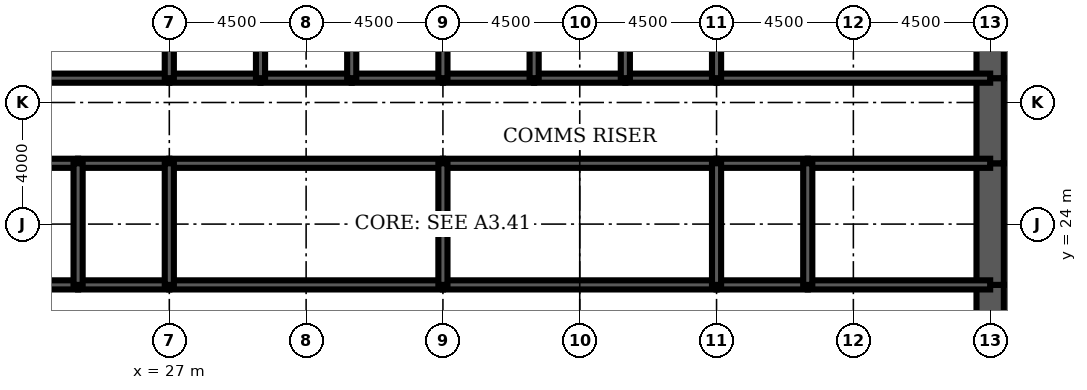
"""IFC4 building model, lengths in metres.
Left out: names, types, materials, properties, quantities, classifications, styles, units other than length and angle.
Written with IfcOpenShell. Run it as: python <this file> out.ifc"""

import sys

from ifc_helpers import new_model, si_unit, direction, frame, frame_2d, origin, place, context, subcontext, project, spatial, rectangle, extrude, element, fill, save


model = new_model("IFC4")
c1 = context("Model", 3, precision=1e-05, world=origin(), true_north=direction((0.0, 1.0)))
c2 = subcontext(c1, "Body", "Model", "MODEL_VIEW")
j1 = project(units=[si_unit("LENGTHUNIT", "METRE"), si_unit("PLANEANGLEUNIT", "RADIAN")], contexts=[c1])
p1 = place(None, origin())
s1 = spatial("IfcSite", under=j1, at=p1, CompositionType="ELEMENT")
p2 = place(p1, origin())
s2 = spatial("IfcBuilding", under=s1, at=p2, CompositionType="ELEMENT")
p3 = place(p2, frame((0.0, 0.0, 176.1)))
s3 = spatial("IfcBuildingStorey", under=s2, at=p3, CompositionType="ELEMENT", Elevation=176.1)
p4 = place(p3, frame((54.0, 19.2, 0.0), z_axis=(0.0, 0.0, 1.0), x_axis=(0.0, 1.0, 0.0)))
e1 = element("IfcWall", 1, at=p4, inside=s3, PredefinedType="SHEAR", context=c2, shape_type="SweptSolid", body=[
    extrude(rectangle(XDim=2.8, YDim=0.9, at=frame_2d((1.4, 0.0))), origin(), (0.0, 0.0, 1.0), 4.2),
])
p5 = place(p4, frame((0.4, 0.0, 0.0)))
e2 = element("IfcOpeningElement", 2, at=p5, cuts=e1, PredefinedType="OPENING", context=c2, shape_type="SweptSolid", body=[
    extrude(rectangle(XDim=1.8, YDim=2.1, at=frame_2d((0.9, 1.05))), frame((0.0, 0.46, 0.0), z_axis=(0.0, -1.0, 0.0), x_axis=(1.0, 0.0, 0.0)), (0.0, 0.0, 1.0), 0.92),
])
p6 = place(p3, frame((54.0, 22.0, 0.0), z_axis=(0.0, 0.0, 1.0), x_axis=(0.0, 1.0, 0.0)))
e3 = element("IfcWall", 3, at=p6, inside=s3, PredefinedType="SHEAR", context=c2, shape_type="SweptSolid", body=[
    extrude(rectangle(XDim=4.0, YDim=0.9, at=frame_2d((2.0, 0.0))), origin(), (0.0, 0.0, 1.0), 4.2),
])
p7 = place(p3, frame((54.0, 26.0, 0.0), z_axis=(0.0, 0.0, 1.0), x_axis=(0.0, 1.0, 0.0)))
e4 = element("IfcWall", 4, at=p7, inside=s3, PredefinedType="SHEAR", context=c2, shape_type="SweptSolid", body=[
    extrude(rectangle(XDim=2.8, YDim=0.9, at=frame_2d((1.4, 0.0))), origin(), (0.0, 0.0, 1.0), 4.2),
])
p8 = place(p7, frame((0.6, 0.0, 0.0)))
e5 = element("IfcOpeningElement", 5, at=p8, cuts=e4, PredefinedType="OPENING", context=c2, shape_type="SweptSolid", body=[
    extrude(rectangle(XDim=1.8, YDim=2.1, at=frame_2d((0.9, 1.05))), frame((0.0, 0.46, 0.0), z_axis=(0.0, -1.0, 0.0), x_axis=(1.0, 0.0, 0.0)), (0.0, 0.0, 1.0), 0.92),
])
p9 = place(p3, frame((54.0, 28.8, 0.0), z_axis=(0.0, 0.0, 1.0), x_axis=(0.0, 1.0, 0.0)))
e6 = element("IfcWall", 6, at=p9, inside=s3, PredefinedType="SHEAR", context=c2, shape_type="SweptSolid", body=[
    extrude(rectangle(XDim=3.2, YDim=0.9, at=frame_2d((1.6, 0.0))), origin(), (0.0, 0.0, 1.0), 4.2),
])
p10 = place(p3, frame((18.0, 28.8, 0.0), z_axis=(0.0, 0.0, 1.0), x_axis=(1.0, 0.0, 0.0)))
e7 = element("IfcWall", 7, at=p10, inside=s3, PredefinedType="SOLIDWALL", context=c2, shape_type="SweptSolid", body=[
    extrude(rectangle(XDim=9.0, YDim=0.3, at=frame_2d((4.5, 0.0))), origin(), (0.0, 0.0, 1.0), 4.2),
])
p11 = place(p10, frame((0.65, 0.0, 0.0)))
e8 = element("IfcOpeningElement", 8, at=p11, cuts=e7, PredefinedType="OPENING", context=c2, shape_type="SweptSolid", body=[
    extrude(rectangle(XDim=1.0, YDim=2.1, at=frame_2d((0.5, 1.05))), frame((0.0, 0.16, 0.0), z_axis=(0.0, -1.0, 0.0), x_axis=(1.0, 0.0, 0.0)), (0.0, 0.0, 1.0), 0.32),
])
p12 = place(p3, frame((27.0, 28.8, 0.0), z_axis=(0.0, 0.0, 1.0), x_axis=(1.0, 0.0, 0.0)))
e9 = element("IfcWall", 9, at=p12, inside=s3, PredefinedType="SOLIDWALL", context=c2, shape_type="SweptSolid", body=[
    extrude(rectangle(XDim=3.0, YDim=0.3, at=frame_2d((1.5, 0.0))), origin(), (0.0, 0.0, 1.0), 4.2),
])
p13 = place(p12, frame((0.95, 0.0, 0.0)))
e10 = element("IfcOpeningElement", 10, at=p13, cuts=e9, PredefinedType="OPENING", context=c2, shape_type="SweptSolid", body=[
    extrude(rectangle(XDim=1.1, YDim=2.2, at=frame_2d((0.55, 1.1))), frame((0.0, 0.16, 0.0), z_axis=(0.0, -1.0, 0.0), x_axis=(1.0, 0.0, 0.0)), (0.0, 0.0, 1.0), 0.32),
])
p14 = place(p3, frame((30.0, 28.8, 0.0), z_axis=(0.0, 0.0, 1.0), x_axis=(1.0, 0.0, 0.0)))
e11 = element("IfcWall", 11, at=p14, inside=s3, PredefinedType="SOLIDWALL", context=c2, shape_type="SweptSolid", body=[
    extrude(rectangle(XDim=3.0, YDim=0.3, at=frame_2d((1.5, 0.0))), origin(), (0.0, 0.0, 1.0), 4.2),
])
p15 = place(p14, frame((0.95, 0.0, 0.0)))
e12 = element("IfcOpeningElement", 12, at=p15, cuts=e11, PredefinedType="OPENING", context=c2, shape_type="SweptSolid", body=[
    extrude(rectangle(XDim=1.1, YDim=2.2, at=frame_2d((0.55, 1.1))), frame((0.0, 0.16, 0.0), z_axis=(0.0, -1.0, 0.0), x_axis=(1.0, 0.0, 0.0)), (0.0, 0.0, 1.0), 0.32),
])
p16 = place(p3, frame((33.0, 28.8, 0.0), z_axis=(0.0, 0.0, 1.0), x_axis=(1.0, 0.0, 0.0)))
e13 = element("IfcWall", 13, at=p16, inside=s3, PredefinedType="SOLIDWALL", context=c2, shape_type="SweptSolid", body=[
    extrude(rectangle(XDim=3.0, YDim=0.3, at=frame_2d((1.5, 0.0))), origin(), (0.0, 0.0, 1.0), 4.2),
])
p17 = place(p16, frame((0.95, 0.0, 0.0)))
e14 = element("IfcOpeningElement", 14, at=p17, cuts=e13, PredefinedType="OPENING", context=c2, shape_type="SweptSolid", body=[
    extrude(rectangle(XDim=1.1, YDim=2.2, at=frame_2d((0.55, 1.1))), frame((0.0, 0.16, 0.0), z_axis=(0.0, -1.0, 0.0), x_axis=(1.0, 0.0, 0.0)), (0.0, 0.0, 1.0), 0.32),
])
for number, where, z_axis, x_axis in (
    (15, (36.0, 28.8, 0.0), (0.0, 0.0, 1.0), (1.0, 0.0, 0.0)),
    (16, (39.0, 28.8, 0.0), (0.0, 0.0, 1.0), (1.0, 0.0, 0.0)),
):
    element("IfcWall", number, at=place(p3, frame(where, z_axis=z_axis, x_axis=x_axis)), inside=s3, PredefinedType="SOLIDWALL", context=c2, shape_type="SweptSolid", body=[
        extrude(rectangle(XDim=3.0, YDim=0.3, at=frame_2d((1.5, 0.0))), origin(), (0.0, 0.0, 1.0), 4.2),
    ])
p18 = place(p3, frame((42.0, 28.8, 0.0), z_axis=(0.0, 0.0, 1.0), x_axis=(1.0, 0.0, 0.0)))
e17 = element("IfcWall", 17, at=p18, inside=s3, PredefinedType="SOLIDWALL", context=c2, shape_type="SweptSolid", body=[
    extrude(rectangle(XDim=3.0, YDim=0.3, at=frame_2d((1.5, 0.0))), origin(), (0.0, 0.0, 1.0), 4.2),
])
p19 = place(p18, frame((0.95, 0.0, 0.0)))
e18 = element("IfcOpeningElement", 18, at=p19, cuts=e17, PredefinedType="OPENING", context=c2, shape_type="SweptSolid", body=[
    extrude(rectangle(XDim=1.1, YDim=2.2, at=frame_2d((0.55, 1.1))), frame((0.0, 0.16, 0.0), z_axis=(0.0, -1.0, 0.0), x_axis=(1.0, 0.0, 0.0)), (0.0, 0.0, 1.0), 0.32),
])
p20 = place(p3, frame((45.0, 28.8, 0.0), z_axis=(0.0, 0.0, 1.0), x_axis=(1.0, 0.0, 0.0)))
e19 = element("IfcWall", 19, at=p20, inside=s3, PredefinedType="SOLIDWALL", context=c2, shape_type="SweptSolid", body=[
    extrude(rectangle(XDim=9.0, YDim=0.3, at=frame_2d((4.5, 0.0))), origin(), (0.0, 0.0, 1.0), 4.2),
])
p21 = place(p20, frame((7.35, 0.0, 0.0)))
e20 = element("IfcOpeningElement", 20, at=p21, cuts=e19, PredefinedType="OPENING", context=c2, shape_type="SweptSolid", body=[
    extrude(rectangle(XDim=1.0, YDim=2.1, at=frame_2d((0.5, 1.05))), frame((0.0, 0.16, 0.0), z_axis=(0.0, -1.0, 0.0), x_axis=(1.0, 0.0, 0.0)), (0.0, 0.0, 1.0), 0.32),
])
p22 = place(p3, frame((18.0, 22.0, 0.0), z_axis=(0.0, 0.0, 1.0), x_axis=(1.0, 0.0, 0.0)))
e21 = element("IfcWall", 21, at=p22, inside=s3, PredefinedType="SOLIDWALL", context=c2, shape_type="SweptSolid", body=[
    extrude(rectangle(XDim=6.0, YDim=0.3, at=frame_2d((3.0, 0.0))), origin(), (0.0, 0.0, 1.0), 4.2),
])
p23 = place(p22, frame((4.4, 0.0, 0.0)))
e22 = element("IfcOpeningElement", 22, at=p23, cuts=e21, PredefinedType="OPENING", context=c2, shape_type="SweptSolid", body=[
    extrude(rectangle(XDim=1.0, YDim=2.1, at=frame_2d((0.5, 1.05))), frame((0.0, 0.16, 0.0), z_axis=(0.0, -1.0, 0.0), x_axis=(1.0, 0.0, 0.0)), (0.0, 0.0, 1.0), 0.32),
])
p24 = place(p22, frame((0.85, 0.0, 0.0)))
e23 = element("IfcOpeningElement", 23, at=p24, cuts=e21, PredefinedType="OPENING", context=c2, shape_type="SweptSolid", body=[
    extrude(rectangle(XDim=1.0, YDim=2.1, at=frame_2d((0.5, 1.05))), frame((0.0, 0.16, 0.0), z_axis=(0.0, -1.0, 0.0), x_axis=(1.0, 0.0, 0.0)), (0.0, 0.0, 1.0), 0.32),
])
p25 = place(p3, frame((24.0, 22.0, 0.0), z_axis=(0.0, 0.0, 1.0), x_axis=(1.0, 0.0, 0.0)))
e24 = element("IfcWall", 24, at=p25, inside=s3, PredefinedType="SOLIDWALL", context=c2, shape_type="SweptSolid", body=[
    extrude(rectangle(XDim=3.0, YDim=0.3, at=frame_2d((1.5, 0.0))), origin(), (0.0, 0.0, 1.0), 4.2),
])
p26 = place(p25, frame((1.0, 0.0, 0.0)))
e25 = element("IfcOpeningElement", 25, at=p26, cuts=e24, PredefinedType="OPENING", context=c2, shape_type="SweptSolid", body=[
    extrude(rectangle(XDim=1.0, YDim=2.1, at=frame_2d((0.5, 1.05))), frame((0.0, 0.16, 0.0), z_axis=(0.0, -1.0, 0.0), x_axis=(1.0, 0.0, 0.0)), (0.0, 0.0, 1.0), 0.32),
])
p27 = place(p3, frame((27.0, 22.0, 0.0), z_axis=(0.0, 0.0, 1.0), x_axis=(1.0, 0.0, 0.0)))
e26 = element("IfcWall", 26, at=p27, inside=s3, PredefinedType="SOLIDWALL", context=c2, shape_type="SweptSolid", body=[
    extrude(rectangle(XDim=9.0, YDim=0.3, at=frame_2d((4.5, 0.0))), origin(), (0.0, 0.0, 1.0), 4.2),
])
p28 = place(p27, frame((4.0, 0.0, 0.0)))
e27 = element("IfcOpeningElement", 27, at=p28, cuts=e26, PredefinedType="OPENING", context=c2, shape_type="SweptSolid", body=[
    extrude(rectangle(XDim=1.0, YDim=2.1, at=frame_2d((0.5, 1.05))), frame((0.0, 0.16, 0.0), z_axis=(0.0, -1.0, 0.0), x_axis=(1.0, 0.0, 0.0)), (0.0, 0.0, 1.0), 0.32),
])
p29 = place(p3, frame((36.0, 22.0, 0.0), z_axis=(0.0, 0.0, 1.0), x_axis=(1.0, 0.0, 0.0)))
e28 = element("IfcWall", 28, at=p29, inside=s3, PredefinedType="SOLIDWALL", context=c2, shape_type="SweptSolid", body=[
    extrude(rectangle(XDim=9.0, YDim=0.3, at=frame_2d((4.5, 0.0))), origin(), (0.0, 0.0, 1.0), 4.2),
])
p30 = place(p29, frame((4.0, 0.0, 0.0)))
e29 = element("IfcOpeningElement", 29, at=p30, cuts=e28, PredefinedType="OPENING", context=c2, shape_type="SweptSolid", body=[
    extrude(rectangle(XDim=1.0, YDim=2.1, at=frame_2d((0.5, 1.05))), frame((0.0, 0.16, 0.0), z_axis=(0.0, -1.0, 0.0), x_axis=(1.0, 0.0, 0.0)), (0.0, 0.0, 1.0), 0.32),
])
p31 = place(p3, frame((45.0, 22.0, 0.0), z_axis=(0.0, 0.0, 1.0), x_axis=(1.0, 0.0, 0.0)))
e30 = element("IfcWall", 30, at=p31, inside=s3, PredefinedType="SOLIDWALL", context=c2, shape_type="SweptSolid", body=[
    extrude(rectangle(XDim=3.0, YDim=0.3, at=frame_2d((1.5, 0.0))), origin(), (0.0, 0.0, 1.0), 4.2),
])
p32 = place(p31, frame((1.0, 0.0, 0.0)))
e31 = element("IfcOpeningElement", 31, at=p32, cuts=e30, PredefinedType="OPENING", context=c2, shape_type="SweptSolid", body=[
    extrude(rectangle(XDim=1.0, YDim=2.1, at=frame_2d((0.5, 1.05))), frame((0.0, 0.16, 0.0), z_axis=(0.0, -1.0, 0.0), x_axis=(1.0, 0.0, 0.0)), (0.0, 0.0, 1.0), 0.32),
])
p33 = place(p3, frame((48.0, 22.0, 0.0), z_axis=(0.0, 0.0, 1.0), x_axis=(1.0, 0.0, 0.0)))
e32 = element("IfcWall", 32, at=p33, inside=s3, PredefinedType="SOLIDWALL", context=c2, shape_type="SweptSolid", body=[
    extrude(rectangle(XDim=6.0, YDim=0.3, at=frame_2d((3.0, 0.0))), origin(), (0.0, 0.0, 1.0), 4.2),
])
p34 = place(p33, frame((2.0, 0.0, 0.0)))
e33 = element("IfcOpeningElement", 33, at=p34, cuts=e32, PredefinedType="OPENING", context=c2, shape_type="SweptSolid", body=[
    extrude(rectangle(XDim=1.0, YDim=2.1, at=frame_2d((0.5, 1.05))), frame((0.0, 0.16, 0.0), z_axis=(0.0, -1.0, 0.0), x_axis=(1.0, 0.0, 0.0)), (0.0, 0.0, 1.0), 0.32),
])
p35 = place(p33, frame((4.0, 0.0, 0.0)))
e34 = element("IfcOpeningElement", 34, at=p35, cuts=e32, PredefinedType="OPENING", context=c2, shape_type="SweptSolid", body=[
    extrude(rectangle(XDim=1.0, YDim=2.1, at=frame_2d((0.5, 1.05))), frame((0.0, 0.16, 0.0), z_axis=(0.0, -1.0, 0.0), x_axis=(1.0, 0.0, 0.0)), (0.0, 0.0, 1.0), 0.32),
])
p36 = place(p3, frame((18.0, 26.0, 0.0), z_axis=(0.0, 0.0, 1.0), x_axis=(1.0, 0.0, 0.0)))
e35 = element("IfcWall", 35, at=p36, inside=s3, PredefinedType="SOLIDWALL", context=c2, shape_type="SweptSolid", body=[
    extrude(rectangle(XDim=6.0, YDim=0.3, at=frame_2d((3.0, 0.0))), origin(), (0.0, 0.0, 1.0), 4.2),
])
p37 = place(p3, frame((24.0, 26.0, 0.0), z_axis=(0.0, 0.0, 1.0), x_axis=(1.0, 0.0, 0.0)))
e36 = element("IfcWall", 36, at=p37, inside=s3, PredefinedType="SOLIDWALL", context=c2, shape_type="SweptSolid", body=[
    extrude(rectangle(XDim=3.0, YDim=0.3, at=frame_2d((1.5, 0.0))), origin(), (0.0, 0.0, 1.0), 4.2),
])
for number, where, z_axis, x_axis in (
    (37, (27.0, 26.0, 0.0), (0.0, 0.0, 1.0), (1.0, 0.0, 0.0)),
    (38, (36.0, 26.0, 0.0), (0.0, 0.0, 1.0), (1.0, 0.0, 0.0)),
):
    element("IfcWall", number, at=place(p3, frame(where, z_axis=z_axis, x_axis=x_axis)), inside=s3, PredefinedType="SOLIDWALL", context=c2, shape_type="SweptSolid", body=[
        extrude(rectangle(XDim=9.0, YDim=0.3, at=frame_2d((4.5, 0.0))), origin(), (0.0, 0.0, 1.0), 4.2),
    ])
p38 = place(p3, frame((45.0, 26.0, 0.0), z_axis=(0.0, 0.0, 1.0), x_axis=(1.0, 0.0, 0.0)))
e39 = element("IfcWall", 39, at=p38, inside=s3, PredefinedType="SOLIDWALL", context=c2, shape_type="SweptSolid", body=[
    extrude(rectangle(XDim=3.0, YDim=0.3, at=frame_2d((1.5, 0.0))), origin(), (0.0, 0.0, 1.0), 4.2),
])
p39 = place(p3, frame((48.0, 26.0, 0.0), z_axis=(0.0, 0.0, 1.0), x_axis=(1.0, 0.0, 0.0)))
e40 = element("IfcWall", 40, at=p39, inside=s3, PredefinedType="SOLIDWALL", context=c2, shape_type="SweptSolid", body=[
    extrude(rectangle(XDim=6.0, YDim=0.3, at=frame_2d((3.0, 0.0))), origin(), (0.0, 0.0, 1.0), 4.2),
])
for number, where, z_axis, x_axis in (
    (41, (27.0, 28.8, 0.0), (0.0, 0.0, 1.0), (0.0, 1.0, 0.0)),
    (42, (30.0, 28.8, 0.0), (0.0, 0.0, 1.0), (0.0, 1.0, 0.0)),
    (43, (33.0, 28.8, 0.0), (0.0, 0.0, 1.0), (0.0, 1.0, 0.0)),
    (44, (36.0, 28.8, 0.0), (0.0, 0.0, 1.0), (0.0, 1.0, 0.0)),
    (45, (39.0, 28.8, 0.0), (0.0, 0.0, 1.0), (0.0, 1.0, 0.0)),
    (46, (42.0, 28.8, 0.0), (0.0, 0.0, 1.0), (0.0, 1.0, 0.0)),
    (47, (45.0, 28.8, 0.0), (0.0, 0.0, 1.0), (0.0, 1.0, 0.0)),
):
    element("IfcWall", number, at=place(p3, frame(where, z_axis=z_axis, x_axis=x_axis)), inside=s3, PredefinedType="SOLIDWALL", context=c2, shape_type="SweptSolid", body=[
        extrude(rectangle(XDim=3.2, YDim=0.3, at=frame_2d((1.6, 0.0))), origin(), (0.0, 0.0, 1.0), 4.2),
    ])
for number, where, z_axis, x_axis in (
    (48, (24.0, 22.0, 0.0), (0.0, 0.0, 1.0), (0.0, 1.0, 0.0)),
    (49, (27.0, 22.0, 0.0), (0.0, 0.0, 1.0), (0.0, 1.0, 0.0)),
    (50, (36.0, 22.0, 0.0), (0.0, 0.0, 1.0), (0.0, 1.0, 0.0)),
    (51, (45.0, 22.0, 0.0), (0.0, 0.0, 1.0), (0.0, 1.0, 0.0)),
    (52, (48.0, 22.0, 0.0), (0.0, 0.0, 1.0), (0.0, 1.0, 0.0)),
):
    element("IfcWall", number, at=place(p3, frame(where, z_axis=z_axis, x_axis=x_axis)), inside=s3, PredefinedType="SOLIDWALL", context=c2, shape_type="SweptSolid", body=[
        extrude(rectangle(XDim=4.0, YDim=0.3, at=frame_2d((2.0, 0.0))), origin(), (0.0, 0.0, 1.0), 4.2),
    ])
p40 = place(p3, frame((42.5, 22.15, 0.0), z_axis=(0.0, 0.0, 1.0), x_axis=(0.0, 1.0, 0.0)))
e53 = element("IfcWall", 53, at=p40, inside=s3, PredefinedType="PARTITIONING", context=c2, shape_type="SweptSolid", body=[
    extrude(rectangle(XDim=3.7, YDim=0.15, at=frame_2d((1.85, 0.0))), origin(), (0.0, 0.0, 1.0), 3.0),
])
p41 = place(p40, frame((2.2, 0.0, 0.0)))
e54 = element("IfcOpeningElement", 54, at=p41, cuts=e53, PredefinedType="OPENING", context=c2, shape_type="SweptSolid", body=[
    extrude(rectangle(XDim=1.0, YDim=2.1, at=frame_2d((0.5, 1.05))), frame((0.0, 0.085, 0.0), z_axis=(0.0, -1.0, 0.0), x_axis=(1.0, 0.0, 0.0)), (0.0, 0.0, 1.0), 0.17),
])
p42 = place(p3, frame((51.375, 22.15, 0.0), z_axis=(0.0, 0.0, 1.0), x_axis=(0.0, 1.0, 0.0)))
e55 = element("IfcWall", 55, at=p42, inside=s3, PredefinedType="PARTITIONING", context=c2, shape_type="SweptSolid", body=[
    extrude(rectangle(XDim=3.7, YDim=0.15, at=frame_2d((1.85, 0.0))), origin(), (0.0, 0.0, 1.0), 3.0),
])
p43 = place(p3, frame((25.2, 26.15, 0.0), z_axis=(0.0, 0.0, 1.0), x_axis=(0.0, 1.0, 0.0)))
e56 = element("IfcWall", 56, at=p43, inside=s3, PredefinedType="PARTITIONING", context=c2, shape_type="SweptSolid", body=[
    extrude(rectangle(XDim=2.5, YDim=0.15, at=frame_2d((1.25, 0.0))), origin(), (0.0, 0.0, 1.0), 3.0),
])
p44 = place(p43, frame((0.35, 0.0, 0.0)))
e57 = element("IfcOpeningElement", 57, at=p44, cuts=e56, PredefinedType="OPENING", context=c2, shape_type="SweptSolid", body=[
    extrude(rectangle(XDim=1.0, YDim=2.1, at=frame_2d((0.5, 1.05))), frame((0.0, 0.085, 0.0), z_axis=(0.0, -1.0, 0.0), x_axis=(1.0, 0.0, 0.0)), (0.0, 0.0, 1.0), 0.17),
])
p45 = place(p41, origin())
e58 = element("IfcDoor", 58, at=p45, inside=s3, OperationType="SINGLE_SWING_RIGHT", PredefinedType="DOOR", context=c2, shape_type="SweptSolid", body=[
    extrude(rectangle(XDim=1.0, YDim=2.1, at=frame_2d((0.5, 1.05))), frame((0.0, 0.025, 0.0), z_axis=(0.0, -1.0, 0.0), x_axis=(1.0, 0.0, 0.0)), (0.0, 0.0, 1.0), 0.05),
])
fill(e54, e58)
p46 = place(p44, origin())
e59 = element("IfcDoor", 59, at=p46, inside=s3, OperationType="SINGLE_SWING_LEFT", PredefinedType="DOOR", context=c2, shape_type="SweptSolid", body=[
    extrude(rectangle(XDim=1.0, YDim=2.1, at=frame_2d((0.5, 1.05))), frame((0.0, 0.025, 0.0), z_axis=(0.0, -1.0, 0.0), x_axis=(1.0, 0.0, 0.0)), (0.0, 0.0, 1.0), 0.05),
])
fill(e57, e59)
p47 = place(p19, origin())
e60 = element("IfcDoor", 60, at=p47, inside=s3, OperationType="DOUBLE_DOOR_SLIDING", PredefinedType="USERDEFINED", context=c2, shape_type="SweptSolid", body=[
    extrude(rectangle(XDim=1.1, YDim=2.2, at=frame_2d((0.55, 1.1))), frame((0.0, 0.025, 0.0), z_axis=(0.0, -1.0, 0.0), x_axis=(1.0, 0.0, 0.0)), (0.0, 0.0, 1.0), 0.05),
])
fill(e18, e60)
p48 = place(p13, origin())
e61 = element("IfcDoor", 61, at=p48, inside=s3, OperationType="DOUBLE_DOOR_SLIDING", PredefinedType="USERDEFINED", context=c2, shape_type="SweptSolid", body=[
    extrude(rectangle(XDim=1.1, YDim=2.2, at=frame_2d((0.55, 1.1))), frame((0.0, 0.025, 0.0), z_axis=(0.0, -1.0, 0.0), x_axis=(1.0, 0.0, 0.0)), (0.0, 0.0, 1.0), 0.05),
])
fill(e10, e61)
p49 = place(p15, origin())
e62 = element("IfcDoor", 62, at=p49, inside=s3, OperationType="DOUBLE_DOOR_SLIDING", PredefinedType="USERDEFINED", context=c2, shape_type="SweptSolid", body=[
    extrude(rectangle(XDim=1.1, YDim=2.2, at=frame_2d((0.55, 1.1))), frame((0.0, 0.025, 0.0), z_axis=(0.0, -1.0, 0.0), x_axis=(1.0, 0.0, 0.0)), (0.0, 0.0, 1.0), 0.05),
])
fill(e12, e62)
p50 = place(p17, origin())
e63 = element("IfcDoor", 63, at=p50, inside=s3, OperationType="DOUBLE_DOOR_SLIDING", PredefinedType="USERDEFINED", context=c2, shape_type="SweptSolid", body=[
    extrude(rectangle(XDim=1.1, YDim=2.2, at=frame_2d((0.55, 1.1))), frame((0.0, 0.025, 0.0), z_axis=(0.0, -1.0, 0.0), x_axis=(1.0, 0.0, 0.0)), (0.0, 0.0, 1.0), 0.05),
])
fill(e14, e63)
p51 = place(p21, origin())
e64 = element("IfcDoor", 64, at=p51, inside=s3, OperationType="SINGLE_SWING_RIGHT", PredefinedType="DOOR", context=c2, shape_type="SweptSolid", body=[
    extrude(rectangle(XDim=1.0, YDim=2.1, at=frame_2d((0.5, 1.05))), frame((0.0, 0.025, 0.0), z_axis=(0.0, -1.0, 0.0), x_axis=(1.0, 0.0, 0.0)), (0.0, 0.0, 1.0), 0.05),
])
fill(e20, e64)
p52 = place(p5, origin())
e65 = element("IfcDoor", 65, at=p52, inside=s3, OperationType="SINGLE_SWING_LEFT", PredefinedType="DOOR", context=c2, shape_type="SweptSolid", body=[
    extrude(rectangle(XDim=1.8, YDim=2.1, at=frame_2d((0.9, 1.05))), frame((0.0, 0.45, 0.0), z_axis=(0.0, -1.0, 0.0), x_axis=(1.0, 0.0, 0.0)), (0.0, 0.0, 1.0), 0.899),
])
fill(e2, e65)
p53 = place(p8, origin())
e66 = element("IfcDoor", 66, at=p53, inside=s3, OperationType="SINGLE_SWING_LEFT", PredefinedType="DOOR", context=c2, shape_type="SweptSolid", body=[
    extrude(rectangle(XDim=1.8, YDim=2.1, at=frame_2d((0.9, 1.05))), frame((0.0, 0.45, 0.0), z_axis=(0.0, -1.0, 0.0), x_axis=(1.0, 0.0, 0.0)), (0.0, 0.0, 1.0), 0.899),
])
fill(e5, e66)
p54 = place(p23, origin())
e67 = element("IfcDoor", 67, at=p54, inside=s3, OperationType="SINGLE_SWING_RIGHT", PredefinedType="DOOR", context=c2, shape_type="SweptSolid", body=[
    extrude(rectangle(XDim=1.0, YDim=2.1, at=frame_2d((0.5, 1.05))), frame((0.0, 0.025, 0.0), z_axis=(0.0, -1.0, 0.0), x_axis=(1.0, 0.0, 0.0)), (0.0, 0.0, 1.0), 0.05),
])
fill(e22, e67)
p55 = place(p26, origin())
e68 = element("IfcDoor", 68, at=p55, inside=s3, OperationType="SINGLE_SWING_LEFT", PredefinedType="DOOR", context=c2, shape_type="SweptSolid", body=[
    extrude(rectangle(XDim=1.0, YDim=2.1, at=frame_2d((0.5, 1.05))), frame((0.0, 0.025, 0.0), z_axis=(0.0, -1.0, 0.0), x_axis=(1.0, 0.0, 0.0)), (0.0, 0.0, 1.0), 0.05),
])
fill(e25, e68)
p56 = place(p28, origin())
e69 = element("IfcDoor", 69, at=p56, inside=s3, OperationType="SINGLE_SWING_LEFT", PredefinedType="DOOR", context=c2, shape_type="SweptSolid", body=[
    extrude(rectangle(XDim=1.0, YDim=2.1, at=frame_2d((0.5, 1.05))), frame((0.0, 0.025, 0.0), z_axis=(0.0, -1.0, 0.0), x_axis=(1.0, 0.0, 0.0)), (0.0, 0.0, 1.0), 0.05),
])
fill(e27, e69)
p57 = place(p30, origin())
e70 = element("IfcDoor", 70, at=p57, inside=s3, OperationType="SINGLE_SWING_LEFT", PredefinedType="DOOR", context=c2, shape_type="SweptSolid", body=[
    extrude(rectangle(XDim=1.0, YDim=2.1, at=frame_2d((0.5, 1.05))), frame((0.0, 0.025, 0.0), z_axis=(0.0, -1.0, 0.0), x_axis=(1.0, 0.0, 0.0)), (0.0, 0.0, 1.0), 0.05),
])
fill(e29, e70)
p58 = place(p32, origin())
e71 = element("IfcDoor", 71, at=p58, inside=s3, OperationType="SINGLE_SWING_LEFT", PredefinedType="DOOR", context=c2, shape_type="SweptSolid", body=[
    extrude(rectangle(XDim=1.0, YDim=2.1, at=frame_2d((0.5, 1.05))), frame((0.0, 0.025, 0.0), z_axis=(0.0, -1.0, 0.0), x_axis=(1.0, 0.0, 0.0)), (0.0, 0.0, 1.0), 0.05),
])
fill(e31, e71)
p59 = place(p34, origin())
e72 = element("IfcDoor", 72, at=p59, inside=s3, OperationType="SINGLE_SWING_LEFT", PredefinedType="DOOR", context=c2, shape_type="SweptSolid", body=[
    extrude(rectangle(XDim=1.0, YDim=2.1, at=frame_2d((0.5, 1.05))), frame((0.0, 0.025, 0.0), z_axis=(0.0, -1.0, 0.0), x_axis=(1.0, 0.0, 0.0)), (0.0, 0.0, 1.0), 0.05),
])
fill(e33, e72)
p60 = place(p35, origin())
e73 = element("IfcDoor", 73, at=p60, inside=s3, OperationType="SINGLE_SWING_RIGHT", PredefinedType="DOOR", context=c2, shape_type="SweptSolid", body=[
    extrude(rectangle(XDim=1.0, YDim=2.1, at=frame_2d((0.5, 1.05))), frame((0.0, 0.025, 0.0), z_axis=(0.0, -1.0, 0.0), x_axis=(1.0, 0.0, 0.0)), (0.0, 0.0, 1.0), 0.05),
])
fill(e34, e73)
save(model, sys.argv[1])
